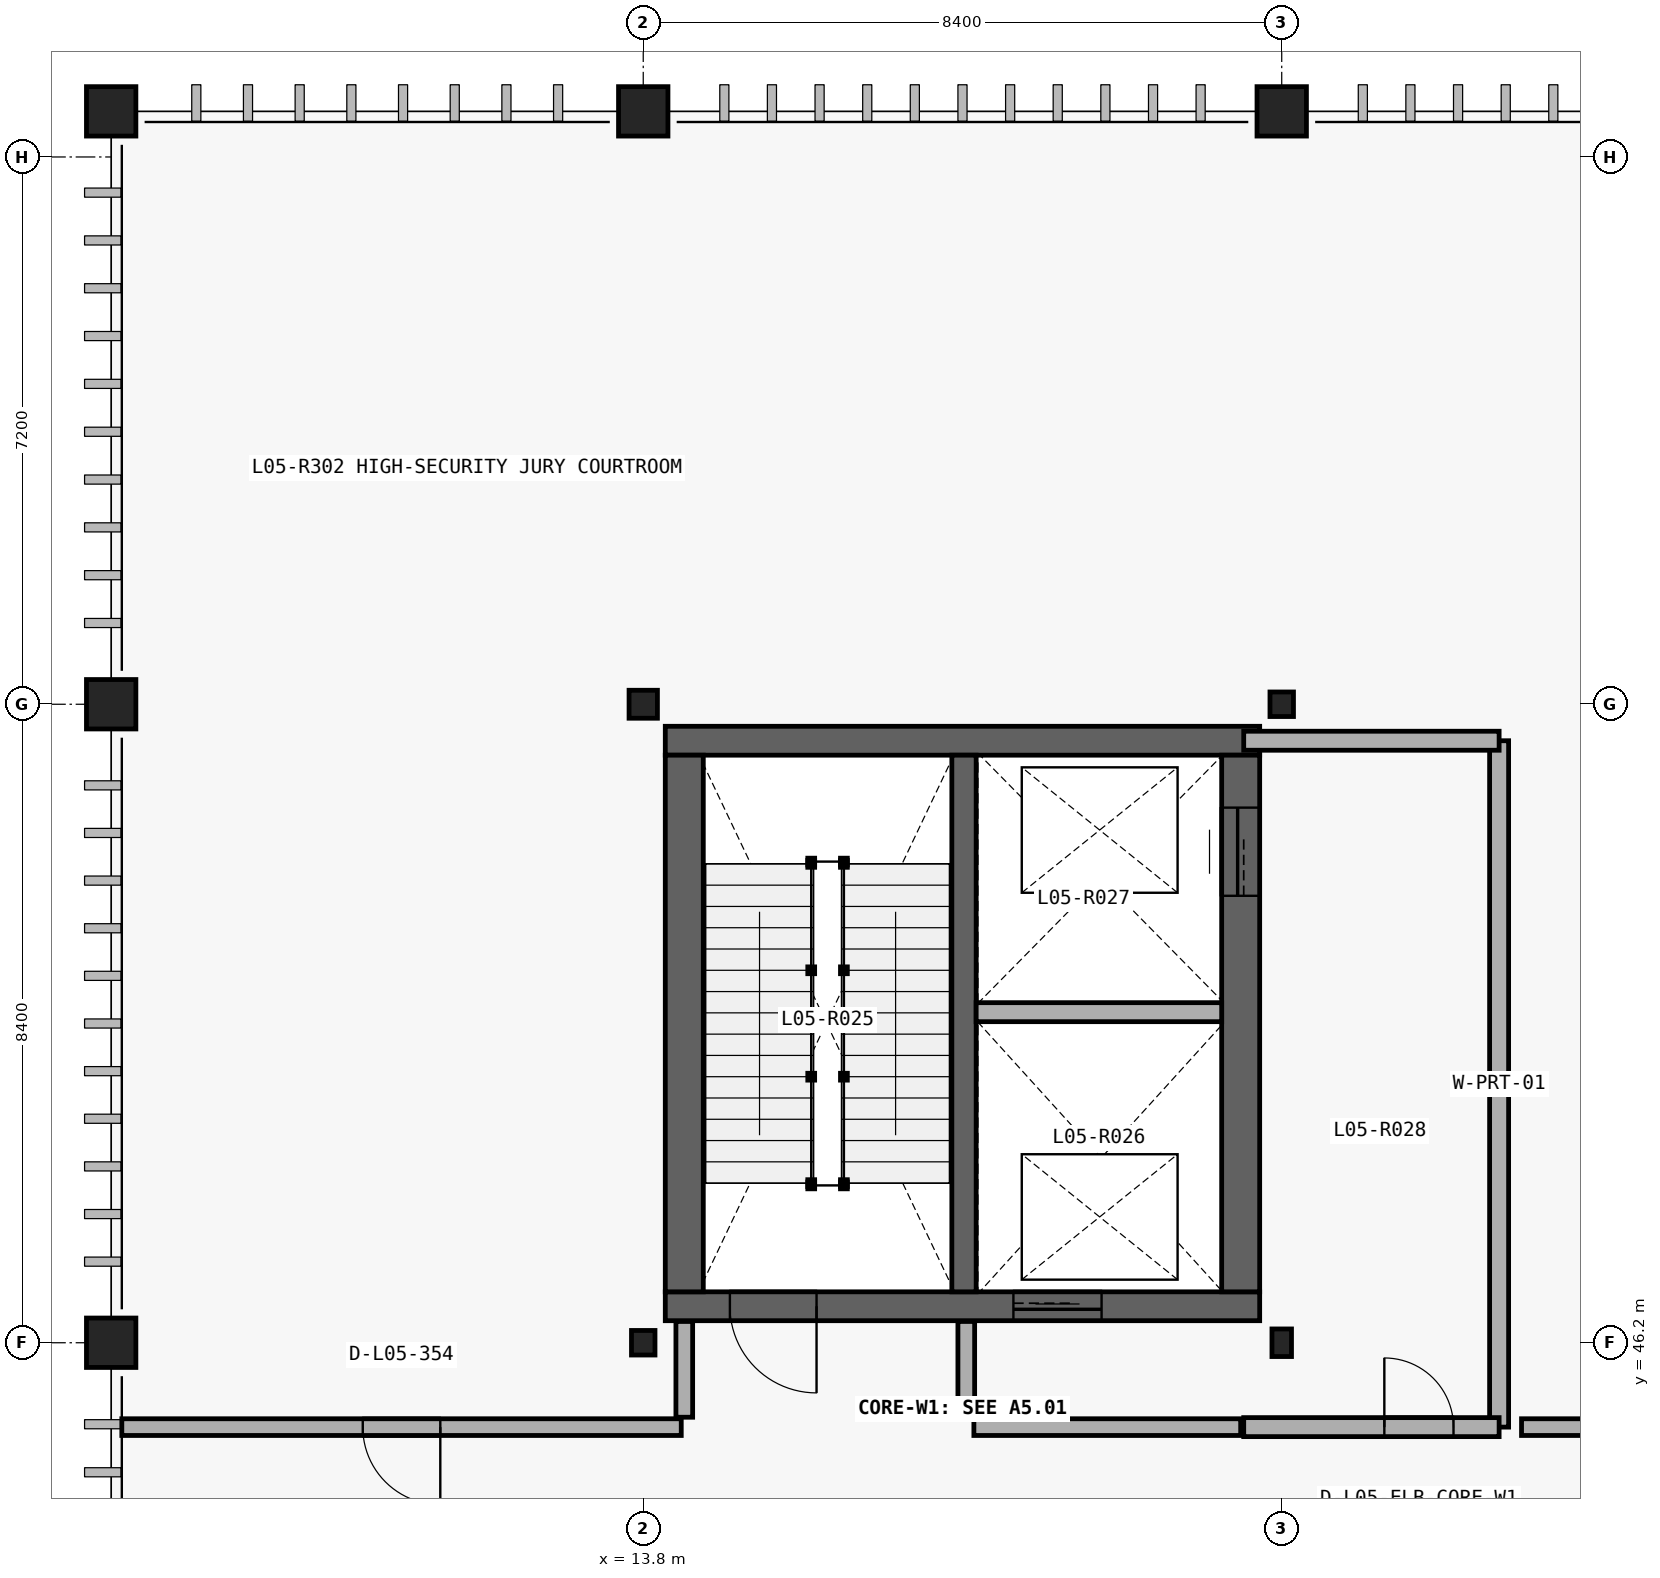
"""IFC4 building model, lengths in metres.
Left out: names, types, materials, properties, quantities, classifications, styles, units other than length and angle.
Written with IfcOpenShell. Run it as: python <this file> out.ifc"""

import sys

from ifc_helpers import new_model, si_unit, direction, frame, frame_2d, origin_with_axes, origin_2d_with_axis, place, context, subcontext, project, spatial, rectangle, circle, i_section, extrude, element, fill, save


model = new_model("IFC4")
c1 = context("Model", 3, precision=1e-05, world=origin_with_axes(), true_north=direction((0.0, 1.0)))
c2 = subcontext(c1, "Body", "Model", "MODEL_VIEW")
j1 = project(units=[si_unit("LENGTHUNIT", "METRE"), si_unit("PLANEANGLEUNIT", "RADIAN")], contexts=[c1])
p1 = place(None, origin_with_axes())
s1 = spatial("IfcSite", under=j1, at=p1, CompositionType="ELEMENT")
p2 = place(p1, origin_with_axes())
s2 = spatial("IfcBuilding", under=s1, at=p2, CompositionType="ELEMENT")
p3 = place(p2, frame((0.0, 0.0, 24.9), z_axis=(0.0, 0.0, 1.0), x_axis=(1.0, 0.0, 0.0)))
s3 = spatial("IfcBuildingStorey", under=s2, at=p3, CompositionType="ELEMENT", Elevation=24.9)
p4 = place(None, frame((14.09, 46.68, 24.9), z_axis=(0.0, 0.0, 1.0), x_axis=(1.0, 0.0, 0.0)))
e1 = element("IfcWall", 1, at=p4, inside=s3, PredefinedType="SHEAR", context=c2, shape_type="SweptSolid", body=[
    extrude(rectangle(XDim=7.82, YDim=0.38, at=frame_2d((3.91, 0.0), x_axis=(1.0, 0.0))), origin_with_axes(), (0.0, 0.0, 1.0), 4.8),
])
p5 = place(None, frame((15.51, 46.68, 24.9), z_axis=(0.0, 0.0, 1.0), x_axis=(1.0, 0.0, 0.0)))
e2 = element("IfcOpeningElement", 2, at=p5, cuts=e1, PredefinedType="OPENING", context=c2, shape_type="SweptSolid", body=[
    extrude(rectangle(XDim=1.14, YDim=2.18, at=frame_2d((0.0, 1.09), x_axis=(1.0, 0.0))), frame((0.0, 0.2, 0.0), z_axis=(0.0, -1.0, 0.0), x_axis=(1.0, 0.0, 0.0)), (0.0, 0.0, 1.0), 0.4),
])
p6 = place(None, frame((19.25, 46.68, 24.9), z_axis=(0.0, 0.0, 1.0), x_axis=(1.0, 0.0, 0.0)))
e3 = element("IfcOpeningElement", 3, at=p6, cuts=e1, PredefinedType="OPENING", context=c2, shape_type="SweptSolid", body=[
    extrude(rectangle(XDim=1.16, YDim=2.2, at=frame_2d((0.0, 1.1), x_axis=(1.0, 0.0))), frame((0.0, 0.2, 0.0), z_axis=(0.0, -1.0, 0.0), x_axis=(1.0, 0.0, 0.0)), (0.0, 0.0, 1.0), 0.4),
])
p7 = place(None, frame((21.91, 54.12, 24.9), z_axis=(0.0, 0.0, 1.0), x_axis=(-1.0, 0.0, 0.0)))
e4 = element("IfcWall", 4, at=p7, inside=s3, PredefinedType="SHEAR", context=c2, shape_type="SweptSolid", body=[
    extrude(rectangle(XDim=7.82, YDim=0.38, at=frame_2d((3.91, 0.0), x_axis=(1.0, 0.0))), origin_with_axes(), (0.0, 0.0, 1.0), 4.8),
])
p8 = place(None, frame((21.66, 46.87, 24.9), z_axis=(0.0, 0.0, 1.0), x_axis=(0.0, 1.0, 0.0)))
e5 = element("IfcWall", 5, at=p8, inside=s3, PredefinedType="SHEAR", context=c2, shape_type="SweptSolid", body=[
    extrude(rectangle(XDim=7.06, YDim=0.5, at=frame_2d((3.53, 0.0), x_axis=(1.0, 0.0))), origin_with_axes(), (0.0, 0.0, 1.0), 4.8),
])
p9 = place(None, frame((21.66, 52.66, 24.9), z_axis=(0.0, 0.0, 1.0), x_axis=(0.0, 1.0, 0.0)))
e6 = element("IfcOpeningElement", 6, at=p9, cuts=e5, PredefinedType="OPENING", context=c2, shape_type="SweptSolid", body=[
    extrude(rectangle(XDim=1.16, YDim=2.2, at=frame_2d((0.0, 1.1), x_axis=(1.0, 0.0))), frame((0.0, 0.26, 0.0), z_axis=(0.0, -1.0, 0.0), x_axis=(1.0, 0.0, 0.0)), (0.0, 0.0, 1.0), 0.52),
])
p10 = place(None, frame((14.34, 53.93, 24.9), z_axis=(0.0, 0.0, 1.0), x_axis=(0.0, -1.0, 0.0)))
e7 = element("IfcWall", 7, at=p10, inside=s3, PredefinedType="SHEAR", context=c2, shape_type="SweptSolid", body=[
    extrude(rectangle(XDim=7.06, YDim=0.5, at=frame_2d((3.53, 0.0), x_axis=(1.0, 0.0))), origin_with_axes(), (0.0, 0.0, 1.0), 4.8),
])
p11 = place(None, frame((18.02, 46.87, 24.9), z_axis=(0.0, 0.0, 1.0), x_axis=(0.0, 1.0, 0.0)))
e8 = element("IfcWall", 8, at=p11, inside=s3, PredefinedType="SHEAR", context=c2, shape_type="SweptSolid", body=[
    extrude(rectangle(XDim=7.06, YDim=0.32, at=frame_2d((3.53, 0.0), x_axis=(1.0, 0.0))), origin_with_axes(), (0.0, 0.0, 1.0), 4.8),
])
p12 = place(None, frame((18.18, 50.549, 24.9), z_axis=(0.0, 0.0, 1.0), x_axis=(1.0, 0.0, 0.0)))
e9 = element("IfcWall", 9, at=p12, inside=s3, PredefinedType="PARTITIONING", context=c2, shape_type="SweptSolid", body=[
    extrude(rectangle(XDim=3.23, YDim=0.25, at=frame_2d((1.615, 0.0), x_axis=(1.0, 0.0))), origin_with_axes(), (0.0, 0.0, 1.0), 4.44),
])
p13 = place(None, frame((25.06, 45.09, 24.9), z_axis=(0.0, 0.0, 1.0), x_axis=(0.0, 1.0, 0.0)))
e10 = element("IfcWall", 10, at=p13, inside=s3, PredefinedType="PARTITIONING", context=c2, shape_type="SweptSolid", body=[
    extrude(rectangle(XDim=9.03, YDim=0.25, at=frame_2d((4.515, 0.0), x_axis=(1.0, 0.0))), origin_with_axes(), (0.0, 0.0, 1.0), 4.44),
])
p14 = place(None, frame((21.7, 54.12, 24.9), z_axis=(0.0, 0.0, 1.0), x_axis=(1.0, 0.0, 0.0)))
e11 = element("IfcWall", 11, at=p14, inside=s3, PredefinedType="PARTITIONING", context=c2, shape_type="SweptSolid", body=[
    extrude(rectangle(XDim=3.36, YDim=0.25, at=frame_2d((1.68, 0.0), x_axis=(1.0, 0.0))), origin_with_axes(), (0.0, 0.0, 1.0), 4.44),
])
p15 = place(None, frame((21.7, 45.09, 24.9), z_axis=(0.0, 0.0, 1.0), x_axis=(1.0, 0.0, 0.0)))
e12 = element("IfcWall", 12, at=p15, inside=s3, PredefinedType="PARTITIONING", context=c2, shape_type="SweptSolid", body=[
    extrude(rectangle(XDim=3.36, YDim=0.25, at=frame_2d((1.68, 0.0), x_axis=(1.0, 0.0))), origin_with_axes(), (0.0, 0.0, 1.0), 4.44),
])
p16 = place(None, frame((24.005, 45.09, 24.9), z_axis=(0.0, 0.0, 1.0), x_axis=(1.0, 0.0, 0.0)))
e13 = element("IfcOpeningElement", 13, at=p16, cuts=e12, PredefinedType="OPENING", context=c2, shape_type="SweptSolid", body=[
    extrude(rectangle(XDim=0.91, YDim=2.12, at=frame_2d((0.0, 1.06), x_axis=(1.0, 0.0))), frame((0.0, 0.135, 0.0), z_axis=(0.0, -1.0, 0.0), x_axis=(1.0, 0.0, 0.0)), (0.0, 0.0, 1.0), 0.27),
])
for number, where, z_axis, x_axis in (
    (14, (14.34, 45.22, 24.9), (0.0, 0.0, 1.0), (0.0, 1.0, 0.0)),
    (15, (18.05, 45.22, 24.9), (0.0, 0.0, 1.0), (0.0, 1.0, 0.0)),
):
    element("IfcWall", number, at=place(None, frame(where, z_axis=z_axis, x_axis=x_axis)), inside=s3, PredefinedType="PARTITIONING", context=c2, shape_type="SweptSolid", body=[
        extrude(rectangle(XDim=1.26, YDim=0.22, at=frame_2d((0.63, 0.0), x_axis=(1.0, 0.0))), origin_with_axes(), (0.0, 0.0, 1.0), 4.44),
    ])
p17 = place(None, frame((6.94, 45.09, 24.9), z_axis=(0.0, 0.0, 1.0), x_axis=(1.0, 0.0, 0.0)))
e16 = element("IfcWall", 16, at=p17, inside=s3, PredefinedType="PARTITIONING", context=c2, shape_type="SweptSolid", body=[
    extrude(rectangle(XDim=7.36, YDim=0.22, at=frame_2d((3.68, 0.0), x_axis=(1.0, 0.0))), origin_with_axes(), (0.0, 0.0, 1.0), 4.44),
])
p18 = place(None, frame((10.62, 45.09, 24.9), z_axis=(0.0, 0.0, 1.0), x_axis=(1.0, 0.0, 0.0)))
e17 = element("IfcOpeningElement", 17, at=p18, cuts=e16, PredefinedType="OPENING", context=c2, shape_type="SweptSolid", body=[
    extrude(rectangle(XDim=1.02, YDim=2.36, at=frame_2d((0.0, 1.18), x_axis=(1.0, 0.0))), frame((0.0, 0.12, 0.0), z_axis=(0.0, -1.0, 0.0), x_axis=(1.0, 0.0, 0.0)), (0.0, 0.0, 1.0), 0.24),
])
p19 = place(None, frame((18.15, 45.09, 24.9), z_axis=(0.0, 0.0, 1.0), x_axis=(1.0, 0.0, 0.0)))
e18 = element("IfcWall", 18, at=p19, inside=s3, PredefinedType="PARTITIONING", context=c2, shape_type="SweptSolid", body=[
    extrude(rectangle(XDim=3.51, YDim=0.22, at=frame_2d((1.755, 0.0), x_axis=(1.0, 0.0))), origin_with_axes(), (0.0, 0.0, 1.0), 4.44),
])
p20 = place(None, frame((25.355, 45.09, 24.9), z_axis=(0.0, 0.0, 1.0), x_axis=(1.0, 0.0, 0.0)))
e19 = element("IfcWall", 19, at=p20, inside=s3, PredefinedType="PARTITIONING", context=c2, shape_type="SweptSolid", body=[
    extrude(rectangle(XDim=5.745, YDim=0.22, at=frame_2d((2.873, 0.0), x_axis=(1.0, 0.0))), origin_with_axes(), (0.0, 0.0, 1.0), 4.44),
])
p21 = place(None, frame((28.227, 45.09, 24.9), z_axis=(0.0, 0.0, 1.0), x_axis=(1.0, 0.0, 0.0)))
e20 = element("IfcOpeningElement", 20, at=p21, cuts=e19, PredefinedType="OPENING", context=c2, shape_type="SweptSolid", body=[
    extrude(rectangle(XDim=2.1, YDim=2.8, at=frame_2d((0.0, 1.4), x_axis=(1.0, 0.0))), frame((0.0, 0.12, 0.0), z_axis=(0.0, -1.0, 0.0), x_axis=(1.0, 0.0, 0.0)), (0.0, 0.0, 1.0), 0.24),
])
for number, where, z_axis, x_axis in (
    (21, (6.8, 46.2, 24.9), (0.0, 0.0, 1.0), (1.0, 0.0, 0.0)),
    (22, (6.8, 54.6, 24.9), (0.0, 0.0, 1.0), (1.0, 0.0, 0.0)),
    (23, (6.8, 62.4, 24.9), (0.0, 0.0, 1.0), (1.0, 0.0, 0.0)),
):
    element("IfcColumn", number, at=place(None, frame(where, z_axis=z_axis, x_axis=x_axis)), inside=s3, PredefinedType="COLUMN", context=c2, shape_type="SweptSolid", body=[
        extrude(circle(Radius=0.325, at=origin_2d_with_axis()), origin_with_axes(), (0.0, 0.0, 1.0), 4.8),
    ])
p22 = place(None, frame((13.8, 46.2, 24.9), z_axis=(0.0, 0.0, 1.0), x_axis=(1.0, 0.0, 0.0)))
e24 = element("IfcColumn", 24, at=p22, inside=s3, PredefinedType="COLUMN", context=c2, shape_type="SweptSolid", body=[
    extrude(i_section(OverallWidth=0.309, OverallDepth=0.323, WebThickness=0.014, FlangeThickness=0.023, at=origin_2d_with_axis()), origin_with_axes(), (0.0, 0.0, 1.0), 4.8),
])
p23 = place(None, frame((13.8, 54.6, 24.9), z_axis=(0.0, 0.0, 1.0), x_axis=(1.0, 0.0, 0.0)))
e25 = element("IfcColumn", 25, at=p23, inside=s3, PredefinedType="COLUMN", context=c2, shape_type="SweptSolid", body=[
    extrude(i_section(OverallWidth=0.373, OverallDepth=0.368, WebThickness=0.015, FlangeThickness=0.024, at=origin_2d_with_axis()), origin_with_axes(), (0.0, 0.0, 1.0), 4.8),
])
p24 = place(None, frame((13.8, 62.4, 24.9), z_axis=(0.0, 0.0, 1.0), x_axis=(1.0, 0.0, 0.0)))
e26 = element("IfcColumn", 26, at=p24, inside=s3, PredefinedType="COLUMN", context=c2, shape_type="SweptSolid", body=[
    extrude(circle(Radius=0.325, at=origin_2d_with_axis()), origin_with_axes(), (0.0, 0.0, 1.0), 4.8),
])
p25 = place(None, frame((22.2, 46.2, 24.9), z_axis=(0.0, 0.0, 1.0), x_axis=(1.0, 0.0, 0.0)))
e27 = element("IfcColumn", 27, at=p25, inside=s3, PredefinedType="COLUMN", context=c2, shape_type="SweptSolid", body=[
    extrude(i_section(OverallWidth=0.257, OverallDepth=0.363, WebThickness=0.013, FlangeThickness=0.022, at=origin_2d_with_axis()), origin_with_axes(), (0.0, 0.0, 1.0), 4.8),
])
p26 = place(None, frame((22.2, 54.6, 24.9), z_axis=(0.0, 0.0, 1.0), x_axis=(1.0, 0.0, 0.0)))
e28 = element("IfcColumn", 28, at=p26, inside=s3, PredefinedType="COLUMN", context=c2, shape_type="SweptSolid", body=[
    extrude(i_section(OverallWidth=0.309, OverallDepth=0.323, WebThickness=0.014, FlangeThickness=0.023, at=origin_2d_with_axis()), origin_with_axes(), (0.0, 0.0, 1.0), 4.8),
])
p27 = place(None, frame((22.2, 62.4, 24.9), z_axis=(0.0, 0.0, 1.0), x_axis=(1.0, 0.0, 0.0)))
e29 = element("IfcColumn", 29, at=p27, inside=s3, PredefinedType="COLUMN", context=c2, shape_type="SweptSolid", body=[
    extrude(circle(Radius=0.325, at=origin_2d_with_axis()), origin_with_axes(), (0.0, 0.0, 1.0), 4.8),
])
p28 = place(None, frame((15.51, 46.68, 24.9), z_axis=(0.0, 0.0, 1.0), x_axis=(-1.0, 0.0, 0.0)))
e30 = element("IfcDoor", 30, at=p28, inside=s3, OperationType="SINGLE_SWING_RIGHT", PredefinedType="DOOR", context=c2, shape_type="SweptSolid", body=[
    extrude(rectangle(XDim=1.14, YDim=2.18, at=frame_2d((0.0, 1.09), x_axis=(1.0, 0.0))), frame((0.0, 0.04, 0.0), z_axis=(0.0, -1.0, 0.0), x_axis=(1.0, 0.0, 0.0)), (0.0, 0.0, 1.0), 0.08),
])
fill(e2, e30)
p29 = place(None, frame((19.25, 46.68, 24.9), z_axis=(0.0, 0.0, 1.0), x_axis=(-1.0, 0.0, 0.0)))
e31 = element("IfcDoor", 31, at=p29, inside=s3, OperationType="SLIDING_TO_LEFT", PredefinedType="DOOR", context=c2, shape_type="SweptSolid", body=[
    extrude(rectangle(XDim=1.16, YDim=2.2, at=frame_2d((0.0, 1.1), x_axis=(1.0, 0.0))), frame((0.0, 0.04, 0.0), z_axis=(0.0, -1.0, 0.0), x_axis=(1.0, 0.0, 0.0)), (0.0, 0.0, 1.0), 0.08),
])
fill(e3, e31)
p30 = place(None, frame((21.66, 52.66, 24.9), z_axis=(0.0, 0.0, 1.0), x_axis=(0.0, 1.0, 0.0)))
e32 = element("IfcDoor", 32, at=p30, inside=s3, OperationType="SLIDING_TO_LEFT", PredefinedType="DOOR", context=c2, shape_type="SweptSolid", body=[
    extrude(rectangle(XDim=1.16, YDim=2.2, at=frame_2d((0.0, 1.1), x_axis=(1.0, 0.0))), frame((0.0, 0.04, 0.0), z_axis=(0.0, -1.0, 0.0), x_axis=(1.0, 0.0, 0.0)), (0.0, 0.0, 1.0), 0.08),
])
fill(e6, e32)
p31 = place(None, frame((24.005, 45.09, 24.9), z_axis=(0.0, 0.0, 1.0), x_axis=(1.0, 0.0, 0.0)))
e33 = element("IfcDoor", 33, at=p31, inside=s3, OperationType="SINGLE_SWING_LEFT", PredefinedType="DOOR", context=c2, shape_type="SweptSolid", body=[
    extrude(rectangle(XDim=0.91, YDim=2.12, at=frame_2d((0.0, 1.06), x_axis=(1.0, 0.0))), frame((0.0, 0.04, 0.0), z_axis=(0.0, -1.0, 0.0), x_axis=(1.0, 0.0, 0.0)), (0.0, 0.0, 1.0), 0.08),
])
fill(e13, e33)
p32 = place(None, frame((10.62, 45.09, 24.9), z_axis=(0.0, 0.0, 1.0), x_axis=(-1.0, 0.0, 0.0)))
e34 = element("IfcDoor", 34, at=p32, inside=s3, OperationType="SINGLE_SWING_RIGHT", PredefinedType="DOOR", context=c2, shape_type="SweptSolid", body=[
    extrude(rectangle(XDim=1.02, YDim=2.36, at=frame_2d((0.0, 1.18), x_axis=(1.0, 0.0))), frame((0.0, 0.04, 0.0), z_axis=(0.0, -1.0, 0.0), x_axis=(1.0, 0.0, 0.0)), (0.0, 0.0, 1.0), 0.08),
])
fill(e17, e34)
save(model, sys.argv[1])
